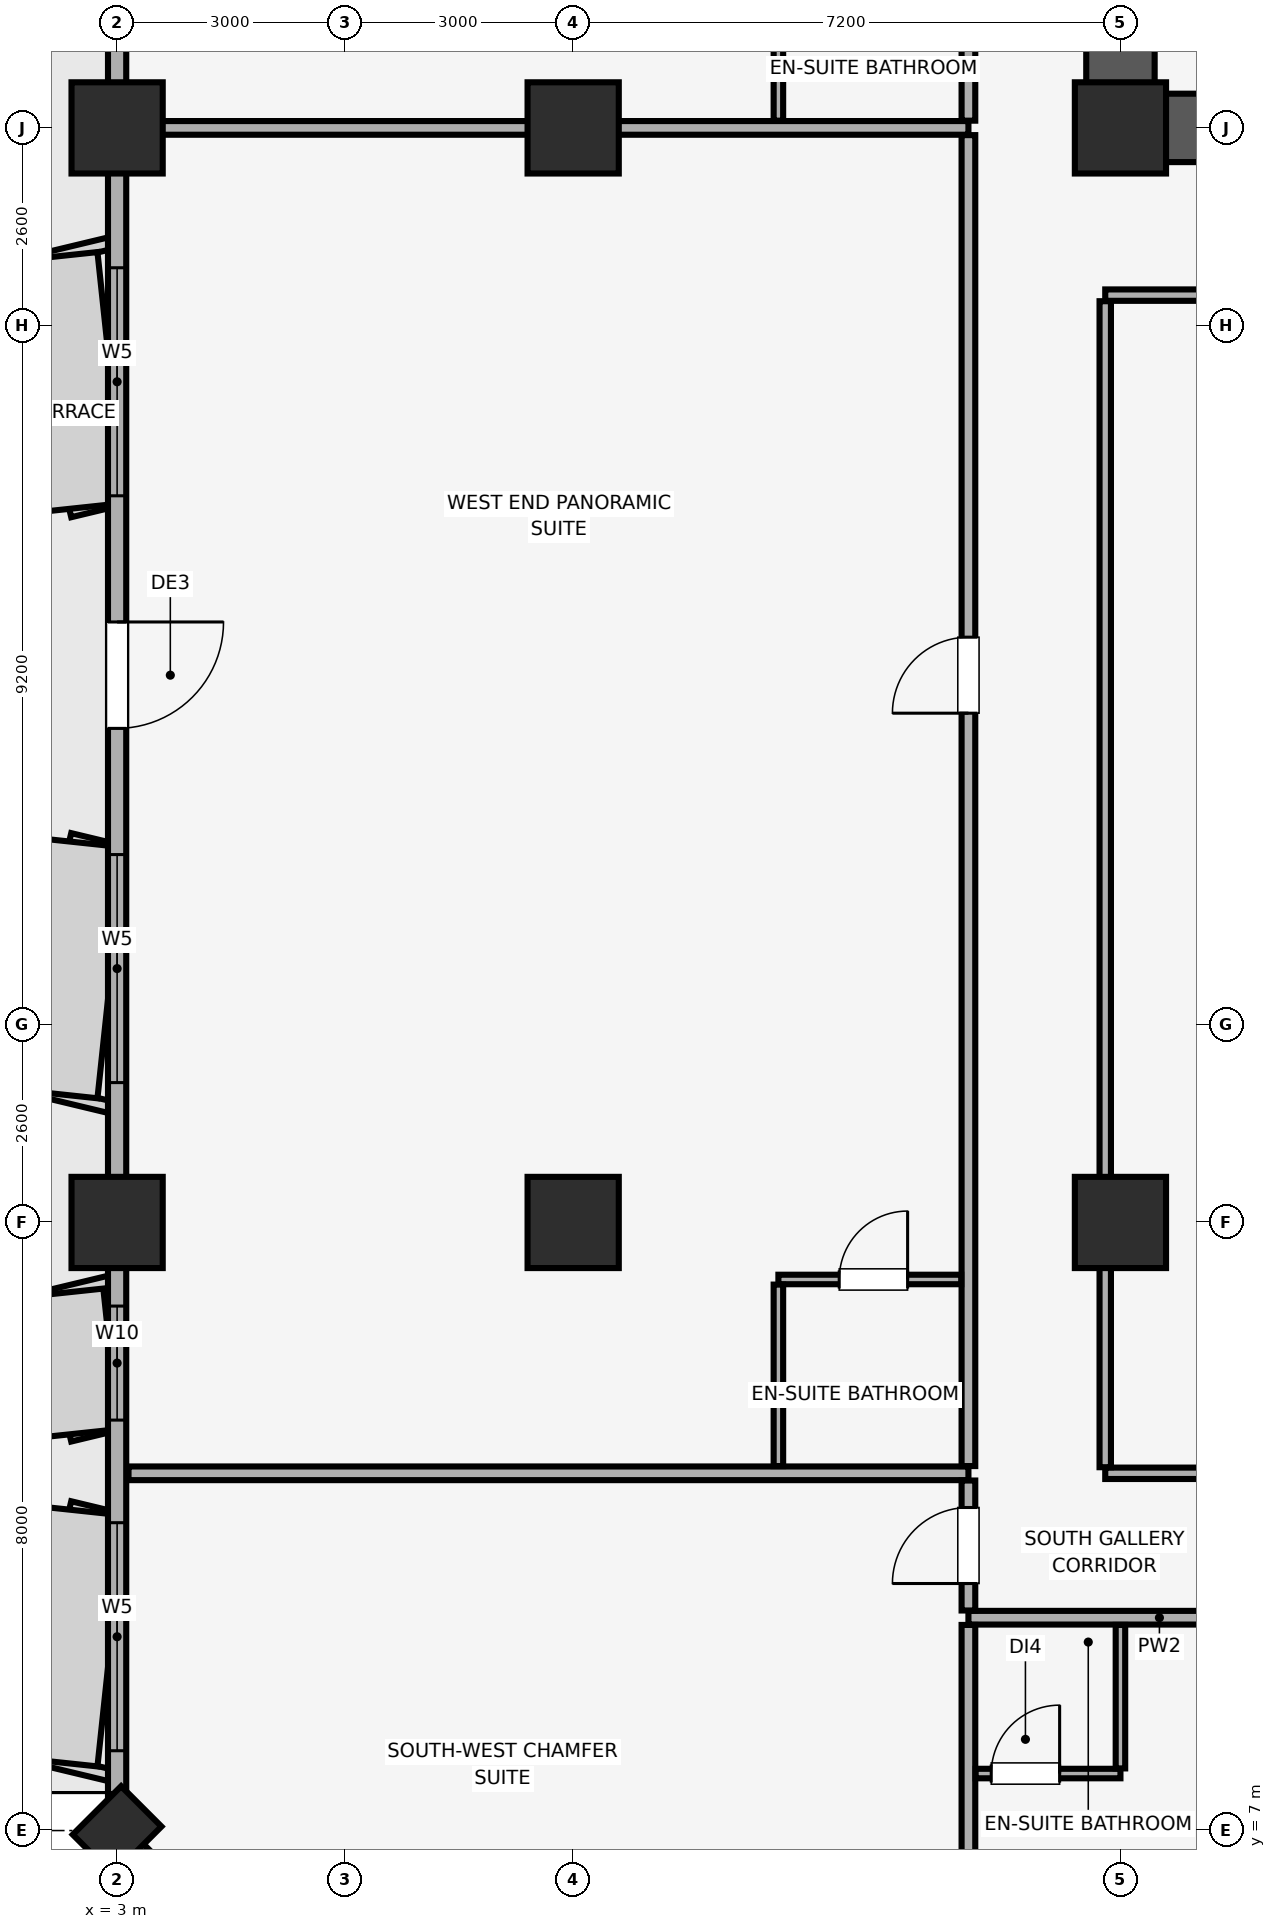
"""IFC4 building model, lengths in metres.
Left out: names, types, materials, properties, quantities, classifications, styles, units other than length and angle.
Written with IfcOpenShell. Run it as: python <this file> out.ifc"""

import sys

from ifc_helpers import new_model, si_unit, direction, frame, frame_2d, origin, origin_2d, place, context, subcontext, project, spatial, rectangle, extrude, element, fill, save


model = new_model("IFC4")
c1 = context("Model", 3, precision=1e-05, world=origin(), true_north=direction((0.0, 1.0)))
c2 = subcontext(c1, "Body", "Model", "MODEL_VIEW")
j1 = project(units=[si_unit("LENGTHUNIT", "METRE"), si_unit("PLANEANGLEUNIT", "RADIAN")], contexts=[c1])
p1 = place(None, origin())
s1 = spatial("IfcSite", under=j1, at=p1, CompositionType="ELEMENT")
p2 = place(p1, origin())
s2 = spatial("IfcBuilding", under=s1, at=p2, CompositionType="ELEMENT")
p3 = place(p2, frame((0.0, 0.0, 135.35)))
s3 = spatial("IfcBuildingStorey", under=s2, at=p3, CompositionType="ELEMENT", Elevation=135.35)
for number, where, z_axis, x_axis in (
    (1, (3.0, 15.0, 0.0), (0.0, 0.0, 1.0), (1.0, 0.0, 0.0)),
    (2, (3.0, 29.4, 0.0), (0.0, 0.0, 1.0), (1.0, 0.0, 0.0)),
):
    element("IfcColumn", number, at=place(p3, frame(where, z_axis=z_axis, x_axis=x_axis)), inside=s3, PredefinedType="COLUMN", context=c2, shape_type="SweptSolid", body=[
        extrude(rectangle(XDim=1.2, YDim=1.2, at=origin_2d()), origin(), (0.0, 0.0, 1.0), 3.56),
    ])
p4 = place(p3, frame((3.0, 7.0, 0.0), z_axis=(0.0, 0.0, 1.0), x_axis=(0.707106781187, 0.707106781187, 0.0)))
e3 = element("IfcColumn", 3, at=p4, inside=s3, PredefinedType="PILASTER", context=c2, shape_type="SweptSolid", body=[
    extrude(rectangle(XDim=0.9, YDim=0.75, at=origin_2d()), origin(), (0.0, 0.0, 1.0), 3.56),
])
for number, where, z_axis, x_axis in (
    (4, (9.0, 15.0, 0.0), (0.0, 0.0, 1.0), (1.0, 0.0, 0.0)),
    (5, (16.2, 15.0, 0.0), (0.0, 0.0, 1.0), (1.0, 0.0, 0.0)),
    (6, (9.0, 29.4, 0.0), (0.0, 0.0, 1.0), (1.0, 0.0, 0.0)),
    (7, (16.2, 29.4, 0.0), (0.0, 0.0, 1.0), (1.0, 0.0, 0.0)),
):
    element("IfcColumn", number, at=place(p3, frame(where, z_axis=z_axis, x_axis=x_axis)), inside=s3, PredefinedType="COLUMN", context=c2, shape_type="SweptSolid", body=[
        extrude(rectangle(XDim=1.2, YDim=1.2, at=origin_2d()), origin(), (0.0, 0.0, 1.0), 3.56),
    ])
p5 = place(p3, frame((3.0, 45.0, 0.0), z_axis=(0.0, 0.0, 1.0), x_axis=(0.0, -1.0, 0.0)))
e8 = element("IfcWall", 8, at=p5, inside=s3, PredefinedType="SOLIDWALL", context=c2, shape_type="SweptSolid", body=[
    extrude(rectangle(XDim=38.0, YDim=0.24, at=frame_2d((19.0, 0.0))), origin(), (0.0, 0.0, 1.0), 2.61),
])
p6 = place(p5, frame((22.1, 0.0, 0.0)))
e9 = element("IfcOpeningElement", 9, at=p6, cuts=e8, PredefinedType="OPENING", context=c2, shape_type="SweptSolid", body=[
    extrude(rectangle(XDim=1.4, YDim=2.2, at=frame_2d((0.7, 1.1))), frame((0.0, 0.13, 0.0), z_axis=(0.0, -1.0, 0.0), x_axis=(1.0, 0.0, 0.0)), (0.0, 0.0, 1.0), 0.26),
])
p7 = place(p5, frame((33.95, 0.0, 0.85)))
e10 = element("IfcOpeningElement", 10, at=p7, cuts=e8, PredefinedType="OPENING", context=c2, shape_type="SweptSolid", body=[
    extrude(rectangle(XDim=3.0, YDim=1.5, at=frame_2d((1.5, 0.75))), frame((0.0, 0.13, 0.0), z_axis=(0.0, -1.0, 0.0), x_axis=(1.0, 0.0, 0.0)), (0.0, 0.0, 1.0), 0.26),
])
p8 = place(p5, frame((31.1, 0.0, 0.85)))
e11 = element("IfcOpeningElement", 11, at=p8, cuts=e8, PredefinedType="OPENING", context=c2, shape_type="SweptSolid", body=[
    extrude(rectangle(XDim=1.5, YDim=1.4, at=frame_2d((0.75, 0.7))), frame((0.0, 0.13, 0.0), z_axis=(0.0, -1.0, 0.0), x_axis=(1.0, 0.0, 0.0)), (0.0, 0.0, 1.0), 0.26),
])
p9 = place(p5, frame((25.16, 0.0, 0.85)))
e12 = element("IfcOpeningElement", 12, at=p9, cuts=e8, PredefinedType="OPENING", context=c2, shape_type="SweptSolid", body=[
    extrude(rectangle(XDim=3.0, YDim=1.5, at=frame_2d((1.5, 0.75))), frame((0.0, 0.13, 0.0), z_axis=(0.0, -1.0, 0.0), x_axis=(1.0, 0.0, 0.0)), (0.0, 0.0, 1.0), 0.26),
])
p10 = place(p5, frame((17.44, 0.0, 0.85)))
e13 = element("IfcOpeningElement", 13, at=p10, cuts=e8, PredefinedType="OPENING", context=c2, shape_type="SweptSolid", body=[
    extrude(rectangle(XDim=3.0, YDim=1.5, at=frame_2d((1.5, 0.75))), frame((0.0, 0.13, 0.0), z_axis=(0.0, -1.0, 0.0), x_axis=(1.0, 0.0, 0.0)), (0.0, 0.0, 1.0), 0.26),
])
p11 = place(p5, frame((9.85, 0.0, 0.85)))
e14 = element("IfcOpeningElement", 14, at=p11, cuts=e8, PredefinedType="OPENING", context=c2, shape_type="SweptSolid", body=[
    extrude(rectangle(XDim=3.0, YDim=1.5, at=frame_2d((1.5, 0.75))), frame((0.0, 0.13, 0.0), z_axis=(0.0, -1.0, 0.0), x_axis=(1.0, 0.0, 0.0)), (0.0, 0.0, 1.0), 0.26),
])
p12 = place(p5, frame((1.085, 0.0, 0.85)))
e15 = element("IfcOpeningElement", 15, at=p12, cuts=e8, PredefinedType="OPENING", context=c2, shape_type="SweptSolid", body=[
    extrude(rectangle(XDim=3.0, YDim=1.5, at=frame_2d((1.5, 0.75))), frame((0.0, 0.13, 0.0), z_axis=(0.0, -1.0, 0.0), x_axis=(1.0, 0.0, 0.0)), (0.0, 0.0, 1.0), 0.26),
])
p13 = place(p3, frame((3.0, 7.0, 0.0), z_axis=(0.0, 0.0, 1.0), x_axis=(0.707106781187, -0.707106781187, 0.0)))
e16 = element("IfcWall", 16, at=p13, inside=s3, PredefinedType="SOLIDWALL", context=c2, shape_type="SweptSolid", body=[
    extrude(rectangle(XDim=5.657, YDim=0.24, at=frame_2d((2.828, 0.0))), origin(), (0.0, 0.0, 1.0), 2.61),
])
p14 = place(p13, frame((1.778, 0.0, 0.85)))
e17 = element("IfcOpeningElement", 17, at=p14, cuts=e16, PredefinedType="OPENING", context=c2, shape_type="SweptSolid", body=[
    extrude(rectangle(XDim=2.1, YDim=1.6, at=frame_2d((1.05, 0.8))), frame((0.0, 0.13, 0.0), z_axis=(0.0, -1.0, 0.0), x_axis=(1.0, 0.0, 0.0)), (0.0, 0.0, 1.0), 0.26),
])
p15 = place(p3, frame((16.2, 29.4, 0.0), z_axis=(0.0, 0.0, 1.0), x_axis=(0.0, 1.0, 0.0)))
e18 = element("IfcWall", 18, at=p15, inside=s3, PredefinedType="SHEAR", context=c2, shape_type="SweptSolid", body=[
    extrude(rectangle(XDim=19.2, YDim=0.9, at=frame_2d((9.6, 0.0))), origin(), (0.0, 0.0, 1.0), 3.56),
])
p16 = place(p3, frame((16.655, 29.4, 0.0), z_axis=(0.0, 0.0, 1.0), x_axis=(1.0, 0.0, 0.0)))
e19 = element("IfcWall", 19, at=p16, inside=s3, PredefinedType="SHEAR", context=c2, shape_type="SweptSolid", body=[
    extrude(rectangle(XDim=6.945, YDim=0.9, at=frame_2d((3.473, 0.0))), origin(), (0.0, 0.0, 1.0), 3.56),
])
p17 = place(p3, frame((14.2, 9.8, 0.0), z_axis=(0.0, 0.0, 1.0), x_axis=(1.0, 0.0, 0.0)))
e20 = element("IfcWall", 20, at=p17, inside=s3, PredefinedType="PARTITIONING", context=c2, shape_type="SweptSolid", body=[
    extrude(rectangle(XDim=5.025, YDim=0.18, at=frame_2d((2.513, 0.0))), origin(), (0.0, 0.0, 1.0), 3.56),
])
p18 = place(p17, frame((3.375, 0.0, 0.0)))
e21 = element("IfcOpeningElement", 21, at=p18, cuts=e20, PredefinedType="OPENING", context=c2, shape_type="SweptSolid", body=[
    extrude(rectangle(XDim=1.0, YDim=2.15, at=frame_2d((0.5, 1.075))), frame((0.0, 0.1, 0.0), z_axis=(0.0, -1.0, 0.0), x_axis=(1.0, 0.0, 0.0)), (0.0, 0.0, 1.0), 0.2),
])
p19 = place(p3, frame((14.2, 3.15, 0.0), z_axis=(0.0, 0.0, 1.0), x_axis=(0.0, 1.0, 0.0)))
e22 = element("IfcWall", 22, at=p19, inside=s3, PredefinedType="PARTITIONING", context=c2, shape_type="SweptSolid", body=[
    extrude(rectangle(XDim=6.555, YDim=0.18, at=frame_2d((3.278, 0.0))), origin(), (0.0, 0.0, 1.0), 3.56),
])
p20 = place(p3, frame((14.295, 7.75, 0.0), z_axis=(0.0, 0.0, 1.0), x_axis=(1.0, 0.0, 0.0)))
e23 = element("IfcWall", 23, at=p20, inside=s3, PredefinedType="PARTITIONING", context=c2, shape_type="SweptSolid", body=[
    extrude(rectangle(XDim=1.905, YDim=0.125, at=frame_2d((0.953, 0.0))), origin(), (0.0, 0.0, 1.0), 3.56),
])
p21 = place(p20, frame((0.205, 0.0, 0.0)))
e24 = element("IfcOpeningElement", 24, at=p21, cuts=e23, PredefinedType="OPENING", context=c2, shape_type="SweptSolid", body=[
    extrude(rectangle(XDim=0.9, YDim=2.1, at=frame_2d((0.45, 1.05))), frame((0.0, 0.073, 0.0), z_axis=(0.0, -1.0, 0.0), x_axis=(1.0, 0.0, 0.0)), (0.0, 0.0, 1.0), 0.145),
])
p22 = place(p3, frame((16.2, 7.817, 0.0), z_axis=(0.0, 0.0, 1.0), x_axis=(0.0, 1.0, 0.0)))
e25 = element("IfcWall", 25, at=p22, inside=s3, PredefinedType="PARTITIONING", context=c2, shape_type="SweptSolid", body=[
    extrude(rectangle(XDim=1.888, YDim=0.125, at=frame_2d((0.944, 0.0))), origin(), (0.0, 0.0, 1.0), 3.01),
])
p23 = place(p3, frame((3.15, 11.7, 0.0), z_axis=(0.0, 0.0, 1.0), x_axis=(1.0, 0.0, 0.0)))
e26 = element("IfcWall", 26, at=p23, inside=s3, PredefinedType="PARTITIONING", context=c2, shape_type="SweptSolid", body=[
    extrude(rectangle(XDim=11.05, YDim=0.18, at=frame_2d((5.525, 0.0))), origin(), (0.0, 0.0, 1.0), 3.56),
])
p24 = place(p3, frame((14.2, 9.895, 0.0), z_axis=(0.0, 0.0, 1.0), x_axis=(0.0, 1.0, 0.0)))
e27 = element("IfcWall", 27, at=p24, inside=s3, PredefinedType="PARTITIONING", context=c2, shape_type="SweptSolid", body=[
    extrude(rectangle(XDim=1.71, YDim=0.18, at=frame_2d((0.855, 0.0))), origin(), (0.0, 0.0, 1.0), 3.56),
])
p25 = place(p24, frame((0.355, 0.0, 0.0)))
e28 = element("IfcOpeningElement", 28, at=p25, cuts=e27, PredefinedType="OPENING", context=c2, shape_type="SweptSolid", body=[
    extrude(rectangle(XDim=1.0, YDim=2.15, at=frame_2d((0.5, 1.075))), frame((0.0, 0.1, 0.0), z_axis=(0.0, -1.0, 0.0), x_axis=(1.0, 0.0, 0.0)), (0.0, 0.0, 1.0), 0.2),
])
p26 = place(p3, frame((3.15, 29.4, 0.0), z_axis=(0.0, 0.0, 1.0), x_axis=(1.0, 0.0, 0.0)))
e29 = element("IfcWall", 29, at=p26, inside=s3, PredefinedType="PARTITIONING", context=c2, shape_type="SweptSolid", body=[
    extrude(rectangle(XDim=11.05, YDim=0.18, at=frame_2d((5.525, 0.0))), origin(), (0.0, 0.0, 1.0), 2.91),
])
p27 = place(p3, frame((14.2, 11.795, 0.0), z_axis=(0.0, 0.0, 1.0), x_axis=(0.0, 1.0, 0.0)))
e30 = element("IfcWall", 30, at=p27, inside=s3, PredefinedType="PARTITIONING", context=c2, shape_type="SweptSolid", body=[
    extrude(rectangle(XDim=17.51, YDim=0.18, at=frame_2d((8.755, 0.0))), origin(), (0.0, 0.0, 1.0), 3.56),
])
p28 = place(p27, frame((9.905, 0.0, 0.0)))
e31 = element("IfcOpeningElement", 31, at=p28, cuts=e30, PredefinedType="OPENING", context=c2, shape_type="SweptSolid", body=[
    extrude(rectangle(XDim=1.0, YDim=2.15, at=frame_2d((0.5, 1.075))), frame((0.0, 0.1, 0.0), z_axis=(0.0, -1.0, 0.0), x_axis=(1.0, 0.0, 0.0)), (0.0, 0.0, 1.0), 0.2),
])
p29 = place(p3, frame((11.7, 14.25, 0.0), z_axis=(0.0, 0.0, 1.0), x_axis=(1.0, 0.0, 0.0)))
e32 = element("IfcWall", 32, at=p29, inside=s3, PredefinedType="PARTITIONING", context=c2, shape_type="SweptSolid", body=[
    extrude(rectangle(XDim=2.405, YDim=0.125, at=frame_2d((1.203, 0.0))), origin(), (0.0, 0.0, 1.0), 3.56),
])
p30 = place(p29, frame((0.8, 0.0, 0.0)))
e33 = element("IfcOpeningElement", 33, at=p30, cuts=e32, PredefinedType="OPENING", context=c2, shape_type="SweptSolid", body=[
    extrude(rectangle(XDim=0.9, YDim=2.1, at=frame_2d((0.45, 1.05))), frame((0.0, 0.073, 0.0), z_axis=(0.0, -1.0, 0.0), x_axis=(1.0, 0.0, 0.0)), (0.0, 0.0, 1.0), 0.145),
])
p31 = place(p3, frame((11.7, 11.795, 0.0), z_axis=(0.0, 0.0, 1.0), x_axis=(0.0, 1.0, 0.0)))
e34 = element("IfcWall", 34, at=p31, inside=s3, PredefinedType="PARTITIONING", context=c2, shape_type="SweptSolid", body=[
    extrude(rectangle(XDim=2.388, YDim=0.125, at=frame_2d((1.194, 0.0))), origin(), (0.0, 0.0, 1.0), 3.56),
])
p32 = place(p3, frame((16.0, 11.7, 0.0), z_axis=(0.0, 0.0, 1.0), x_axis=(1.0, 0.0, 0.0)))
e35 = element("IfcWall", 35, at=p32, inside=s3, PredefinedType="PARTITIONING", context=c2, shape_type="SweptSolid", body=[
    extrude(rectangle(XDim=9.0, YDim=0.15, at=frame_2d((4.5, 0.0))), origin(), (0.0, 0.0, 1.0), 3.56),
])
p33 = place(p3, frame((16.0, 27.2, 0.0), z_axis=(0.0, 0.0, 1.0), x_axis=(1.0, 0.0, 0.0)))
e36 = element("IfcWall", 36, at=p33, inside=s3, PredefinedType="PARTITIONING", context=c2, shape_type="SweptSolid", body=[
    extrude(rectangle(XDim=9.0, YDim=0.15, at=frame_2d((4.5, 0.0))), origin(), (0.0, 0.0, 1.0), 3.56),
])
p34 = place(p33, frame((4.0, 0.0, 0.0)))
e37 = element("IfcOpeningElement", 37, at=p34, cuts=e36, PredefinedType="OPENING", context=c2, shape_type="SweptSolid", body=[
    extrude(rectangle(XDim=1.0, YDim=2.15, at=frame_2d((0.5, 1.075))), frame((0.0, 0.085, 0.0), z_axis=(0.0, -1.0, 0.0), x_axis=(1.0, 0.0, 0.0)), (0.0, 0.0, 1.0), 0.17),
])
p35 = place(p3, frame((16.0, 11.78, 0.0), z_axis=(0.0, 0.0, 1.0), x_axis=(0.0, 1.0, 0.0)))
e38 = element("IfcWall", 38, at=p35, inside=s3, PredefinedType="PARTITIONING", context=c2, shape_type="SweptSolid", body=[
    extrude(rectangle(XDim=15.34, YDim=0.15, at=frame_2d((7.67, 0.0))), origin(), (0.0, 0.0, 1.0), 3.01),
])
p36 = place(p3, frame((14.2, 29.495, 0.0), z_axis=(0.0, 0.0, 1.0), x_axis=(0.0, 1.0, 0.0)))
e39 = element("IfcWall", 39, at=p36, inside=s3, PredefinedType="PARTITIONING", context=c2, shape_type="SweptSolid", body=[
    extrude(rectangle(XDim=7.91, YDim=0.18, at=frame_2d((3.955, 0.0))), origin(), (0.0, 0.0, 1.0), 3.56),
])
p37 = place(p36, frame((4.96, 0.0, 0.0)))
e40 = element("IfcOpeningElement", 40, at=p37, cuts=e39, PredefinedType="OPENING", context=c2, shape_type="SweptSolid", body=[
    extrude(rectangle(XDim=1.0, YDim=2.15, at=frame_2d((0.5, 1.075))), frame((0.0, 0.1, 0.0), z_axis=(0.0, -1.0, 0.0), x_axis=(1.0, 0.0, 0.0)), (0.0, 0.0, 1.0), 0.2),
])
p38 = place(p3, frame((11.7, 29.495, 0.0), z_axis=(0.0, 0.0, 1.0), x_axis=(0.0, 1.0, 0.0)))
e41 = element("IfcWall", 41, at=p38, inside=s3, PredefinedType="PARTITIONING", context=c2, shape_type="SweptSolid", body=[
    extrude(rectangle(XDim=1.947, YDim=0.125, at=frame_2d((0.974, 0.0))), origin(), (0.0, 0.0, 1.0), 3.56),
])
p39 = place(p6, origin())
e42 = element("IfcDoor", 42, at=p39, inside=s3, OperationType="SINGLE_SWING_LEFT", PredefinedType="DOOR", context=c2, shape_type="SweptSolid", body=[
    extrude(rectangle(XDim=1.4, YDim=2.2, at=frame_2d((0.7, 1.1))), frame((0.0, 0.025, 0.0), z_axis=(0.0, -1.0, 0.0), x_axis=(1.0, 0.0, 0.0)), (0.0, 0.0, 1.0), 0.05),
])
fill(e9, e42)
p40 = place(p7, origin())
e43 = element("IfcWindow", 43, at=p40, inside=s3, PartitioningType="SINGLE_PANEL", PredefinedType="WINDOW", context=c2, shape_type="SweptSolid", body=[
    extrude(rectangle(XDim=3.0, YDim=1.5, at=frame_2d((1.5, 0.75))), frame((0.0, 0.03, 0.0), z_axis=(0.0, -1.0, 0.0), x_axis=(1.0, 0.0, 0.0)), (0.0, 0.0, 1.0), 0.06),
])
fill(e10, e43)
p41 = place(p8, origin())
e44 = element("IfcWindow", 44, at=p41, inside=s3, PartitioningType="SINGLE_PANEL", PredefinedType="WINDOW", context=c2, shape_type="SweptSolid", body=[
    extrude(rectangle(XDim=1.5, YDim=1.4, at=frame_2d((0.75, 0.7))), frame((0.0, 0.03, 0.0), z_axis=(0.0, -1.0, 0.0), x_axis=(1.0, 0.0, 0.0)), (0.0, 0.0, 1.0), 0.06),
])
fill(e11, e44)
p42 = place(p9, origin())
e45 = element("IfcWindow", 45, at=p42, inside=s3, PartitioningType="SINGLE_PANEL", PredefinedType="WINDOW", context=c2, shape_type="SweptSolid", body=[
    extrude(rectangle(XDim=3.0, YDim=1.5, at=frame_2d((1.5, 0.75))), frame((0.0, 0.03, 0.0), z_axis=(0.0, -1.0, 0.0), x_axis=(1.0, 0.0, 0.0)), (0.0, 0.0, 1.0), 0.06),
])
fill(e12, e45)
p43 = place(p10, origin())
e46 = element("IfcWindow", 46, at=p43, inside=s3, PartitioningType="SINGLE_PANEL", PredefinedType="WINDOW", context=c2, shape_type="SweptSolid", body=[
    extrude(rectangle(XDim=3.0, YDim=1.5, at=frame_2d((1.5, 0.75))), frame((0.0, 0.03, 0.0), z_axis=(0.0, -1.0, 0.0), x_axis=(1.0, 0.0, 0.0)), (0.0, 0.0, 1.0), 0.06),
])
fill(e13, e46)
p44 = place(p21, origin())
e47 = element("IfcDoor", 47, at=p44, inside=s3, OperationType="SINGLE_SWING_RIGHT", PredefinedType="DOOR", context=c2, shape_type="SweptSolid", body=[
    extrude(rectangle(XDim=0.9, YDim=2.1, at=frame_2d((0.45, 1.05))), frame((0.0, 0.025, 0.0), z_axis=(0.0, -1.0, 0.0), x_axis=(1.0, 0.0, 0.0)), (0.0, 0.0, 1.0), 0.05),
])
fill(e24, e47)
p45 = place(p25, origin())
e48 = element("IfcDoor", 48, at=p45, inside=s3, OperationType="SINGLE_SWING_LEFT", PredefinedType="DOOR", context=c2, shape_type="SweptSolid", body=[
    extrude(rectangle(XDim=1.0, YDim=2.15, at=frame_2d((0.5, 1.075))), frame((0.0, 0.025, 0.0), z_axis=(0.0, -1.0, 0.0), x_axis=(1.0, 0.0, 0.0)), (0.0, 0.0, 1.0), 0.05),
])
fill(e28, e48)
p46 = place(p28, origin())
e49 = element("IfcDoor", 49, at=p46, inside=s3, OperationType="SINGLE_SWING_LEFT", PredefinedType="DOOR", context=c2, shape_type="SweptSolid", body=[
    extrude(rectangle(XDim=1.0, YDim=2.15, at=frame_2d((0.5, 1.075))), frame((0.0, 0.025, 0.0), z_axis=(0.0, -1.0, 0.0), x_axis=(1.0, 0.0, 0.0)), (0.0, 0.0, 1.0), 0.05),
])
fill(e31, e49)
p47 = place(p30, origin())
e50 = element("IfcDoor", 50, at=p47, inside=s3, OperationType="SINGLE_SWING_RIGHT", PredefinedType="DOOR", context=c2, shape_type="SweptSolid", body=[
    extrude(rectangle(XDim=0.9, YDim=2.1, at=frame_2d((0.45, 1.05))), frame((0.0, 0.025, 0.0), z_axis=(0.0, -1.0, 0.0), x_axis=(1.0, 0.0, 0.0)), (0.0, 0.0, 1.0), 0.05),
])
fill(e33, e50)
save(model, sys.argv[1])
